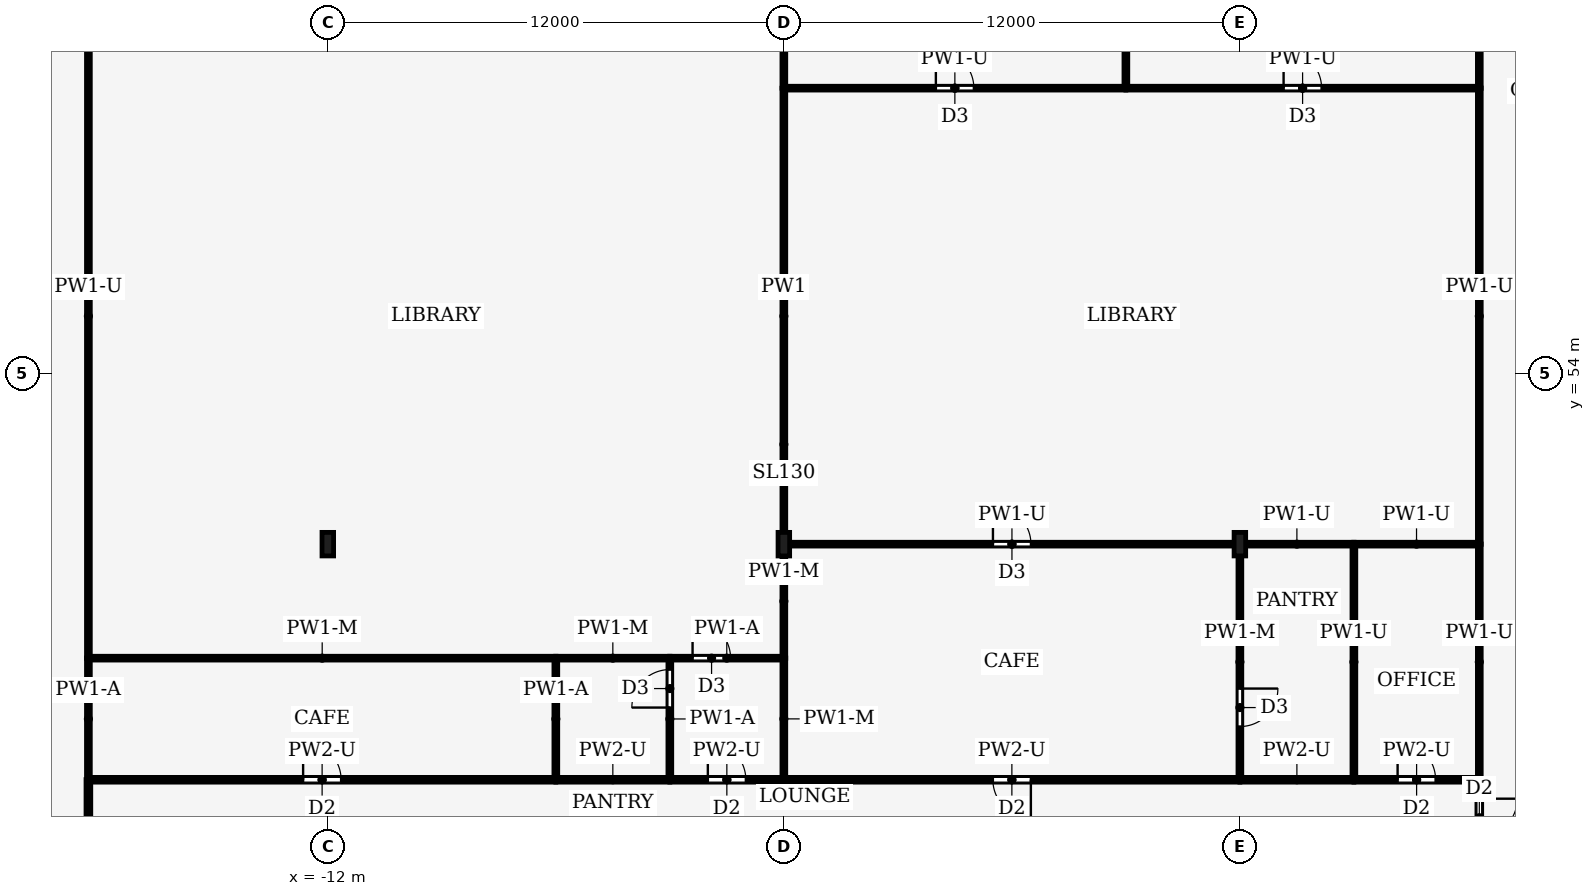
"""IFC4 building model, lengths in metres.
Left out: names, types, materials, properties, quantities, classifications, styles, units other than length and angle.
Written with IfcOpenShell. Run it as: python <this file> out.ifc"""

import sys

from ifc_helpers import new_model, si_unit, direction, frame, frame_2d, origin, origin_2d, place, context, subcontext, project, spatial, rectangle, i_section, extrude, element, fill, save


model = new_model("IFC4")
c1 = context("Model", 3, precision=1e-05, world=origin(), true_north=direction((0.0, 1.0)))
c2 = subcontext(c1, "Body", "Model", "MODEL_VIEW")
j1 = project(units=[si_unit("LENGTHUNIT", "METRE"), si_unit("PLANEANGLEUNIT", "RADIAN")], contexts=[c1])
p1 = place(None, origin())
s1 = spatial("IfcSite", under=j1, at=p1, CompositionType="ELEMENT")
p2 = place(p1, origin())
s2 = spatial("IfcBuilding", under=s1, at=p2, CompositionType="ELEMENT")
p3 = place(p2, frame((0.0, 0.0, 177.0)))
s3 = spatial("IfcBuildingStorey", under=s2, at=p3, CompositionType="ELEMENT", Elevation=177.0)
for number, where, z_axis, x_axis in (
    (1, (-12.0, 49.5, 0.0), (0.0, 0.0, 1.0), (1.0, 0.0, 0.0)),
    (2, (0.0, 49.5, 0.0), (0.0, 0.0, 1.0), (1.0, 0.0, 0.0)),
    (3, (12.0, 49.5, 0.0), (0.0, 0.0, 1.0), (1.0, 0.0, 0.0)),
):
    element("IfcColumn", number, at=place(p3, frame(where, z_axis=z_axis, x_axis=x_axis)), inside=s3, PredefinedType="COLUMN", context=c2, shape_type="SweptSolid", body=[
        extrude(i_section(OverallWidth=0.305, OverallDepth=0.62, WebThickness=0.021, FlangeThickness=0.04, FilletRadius=0.027, at=origin_2d()), origin(), (0.0, 0.0, 1.0), 5.0),
    ])
p4 = place(p3, frame((-18.3, 43.3, 0.0), z_axis=(0.0, 0.0, 1.0), x_axis=(1.0, 0.0, 0.0)))
e4 = element("IfcWall", 4, at=p4, inside=s3, PredefinedType="PARTITIONING", context=c2, shape_type="SweptSolid", body=[
    extrude(rectangle(XDim=12.3, YDim=0.125, at=frame_2d((6.15, 0.0))), origin(), (0.0, 0.0, 1.0), 4.44),
])
p5 = place(p4, frame((5.65, 0.0, 0.0)))
e5 = element("IfcOpeningElement", 5, at=p5, cuts=e4, PredefinedType="OPENING", context=c2, shape_type="SweptSolid", body=[
    extrude(rectangle(XDim=1.0, YDim=2.1, at=frame_2d((0.5, 1.05))), frame((0.0, 0.073, 0.0), z_axis=(0.0, -1.0, 0.0), x_axis=(1.0, 0.0, 0.0)), (0.0, 0.0, 1.0), 0.145),
])
p6 = place(p3, frame((-3.0, 43.3, 0.0), z_axis=(0.0, 0.0, 1.0), x_axis=(-1.0, 0.0, 0.0)))
e6 = element("IfcWall", 6, at=p6, inside=s3, PredefinedType="PARTITIONING", context=c2, shape_type="SweptSolid", body=[
    extrude(rectangle(XDim=3.0, YDim=0.125, at=frame_2d((1.5, 0.0))), origin(), (0.0, 0.0, 1.0), 4.44),
])
p7 = place(p3, frame((-3.0, 43.3, 0.0), z_axis=(0.0, 0.0, 1.0), x_axis=(1.0, 0.0, 0.0)))
e7 = element("IfcWall", 7, at=p7, inside=s3, PredefinedType="PARTITIONING", context=c2, shape_type="SweptSolid", body=[
    extrude(rectangle(XDim=3.0, YDim=0.125, at=frame_2d((1.5, 0.0))), origin(), (0.0, 0.0, 1.0), 4.44),
])
p8 = place(p7, frame((1.0, 0.0, 0.0)))
e8 = element("IfcOpeningElement", 8, at=p8, cuts=e7, PredefinedType="OPENING", context=c2, shape_type="SweptSolid", body=[
    extrude(rectangle(XDim=1.0, YDim=2.1, at=frame_2d((0.5, 1.05))), frame((0.0, 0.073, 0.0), z_axis=(0.0, -1.0, 0.0), x_axis=(1.0, 0.0, 0.0)), (0.0, 0.0, 1.0), 0.145),
])
p9 = place(p3, frame((12.0, 43.3, 0.0), z_axis=(0.0, 0.0, 1.0), x_axis=(-1.0, 0.0, 0.0)))
e9 = element("IfcWall", 9, at=p9, inside=s3, PredefinedType="PARTITIONING", context=c2, shape_type="SweptSolid", body=[
    extrude(rectangle(XDim=12.0, YDim=0.125, at=frame_2d((6.0, 0.0))), origin(), (0.0, 0.0, 1.0), 4.44),
])
p10 = place(p9, frame((5.5, 0.0, 0.0)))
e10 = element("IfcOpeningElement", 10, at=p10, cuts=e9, PredefinedType="OPENING", context=c2, shape_type="SweptSolid", body=[
    extrude(rectangle(XDim=1.0, YDim=2.1, at=frame_2d((0.5, 1.05))), frame((0.0, 0.073, 0.0), z_axis=(0.0, -1.0, 0.0), x_axis=(1.0, 0.0, 0.0)), (0.0, 0.0, 1.0), 0.145),
])
p11 = place(p3, frame((15.0, 43.3, 0.0), z_axis=(0.0, 0.0, 1.0), x_axis=(-1.0, 0.0, 0.0)))
e11 = element("IfcWall", 11, at=p11, inside=s3, PredefinedType="PARTITIONING", context=c2, shape_type="SweptSolid", body=[
    extrude(rectangle(XDim=3.0, YDim=0.125, at=frame_2d((1.5, 0.0))), origin(), (0.0, 0.0, 1.0), 4.44),
])
p12 = place(p3, frame((15.0, 43.3, 0.0), z_axis=(0.0, 0.0, 1.0), x_axis=(1.0, 0.0, 0.0)))
e12 = element("IfcWall", 12, at=p12, inside=s3, PredefinedType="PARTITIONING", context=c2, shape_type="SweptSolid", body=[
    extrude(rectangle(XDim=3.3, YDim=0.125, at=frame_2d((1.65, 0.0))), origin(), (0.0, 0.0, 1.0), 4.44),
])
p13 = place(p12, frame((1.15, 0.0, 0.0)))
e13 = element("IfcOpeningElement", 13, at=p13, cuts=e12, PredefinedType="OPENING", context=c2, shape_type="SweptSolid", body=[
    extrude(rectangle(XDim=1.0, YDim=2.1, at=frame_2d((0.5, 1.05))), frame((0.0, 0.073, 0.0), z_axis=(0.0, -1.0, 0.0), x_axis=(1.0, 0.0, 0.0)), (0.0, 0.0, 1.0), 0.145),
])
p14 = place(p3, frame((-18.3, 43.304, 0.0), z_axis=(0.0, 0.0, 1.0), x_axis=(0.0, -1.0, 0.0)))
e14 = element("IfcWall", 14, at=p14, inside=s3, PredefinedType="PARTITIONING", context=c2, shape_type="SweptSolid", body=[
    extrude(rectangle(XDim=8.804, YDim=0.125, at=frame_2d((4.402, 0.0))), origin(), (0.0, 0.0, 1.0), 4.14),
])
p15 = place(p14, frame((4.302, 0.0, 0.0)))
e15 = element("IfcOpeningElement", 15, at=p15, cuts=e14, PredefinedType="OPENING", context=c2, shape_type="SweptSolid", body=[
    extrude(rectangle(XDim=1.8, YDim=2.1, at=frame_2d((0.9, 1.05))), frame((0.0, 0.073, 0.0), z_axis=(0.0, -1.0, 0.0), x_axis=(1.0, 0.0, 0.0)), (0.0, 0.0, 1.0), 0.145),
])
p16 = place(p3, frame((18.3, 43.304, 0.0), z_axis=(0.0, 0.0, 1.0), x_axis=(0.0, -1.0, 0.0)))
e16 = element("IfcWall", 16, at=p16, inside=s3, PredefinedType="PARTITIONING", context=c2, shape_type="SweptSolid", body=[
    extrude(rectangle(XDim=2.804, YDim=0.125, at=frame_2d((1.402, 0.0))), origin(), (0.0, 0.0, 1.0), 4.87),
])
p17 = place(p16, frame((0.502, 0.0, 0.0)))
e17 = element("IfcOpeningElement", 17, at=p17, cuts=e16, PredefinedType="OPENING", context=c2, shape_type="SweptSolid", body=[
    extrude(rectangle(XDim=1.0, YDim=2.1, at=frame_2d((0.5, 1.05))), frame((0.0, 0.073, 0.0), z_axis=(0.0, -1.0, 0.0), x_axis=(1.0, 0.0, 0.0)), (0.0, 0.0, 1.0), 0.145),
])
p18 = place(p3, frame((-6.0, 43.3, 0.0), z_axis=(0.0, 0.0, 1.0), x_axis=(0.0, 1.0, 0.0)))
e18 = element("IfcWall", 18, at=p18, inside=s3, PredefinedType="PARTITIONING", context=c2, shape_type="SweptSolid", body=[
    extrude(rectangle(XDim=3.2, YDim=0.1, at=frame_2d((1.6, 0.0))), origin(), (0.0, 0.0, 1.0), 4.87),
])
p19 = place(p3, frame((-5.996, 46.5, 0.0), z_axis=(0.0, 0.0, 1.0), x_axis=(-1.0, 0.0, 0.0)))
e19 = element("IfcWall", 19, at=p19, inside=s3, PredefinedType="PARTITIONING", context=c2, shape_type="SweptSolid", body=[
    extrude(rectangle(XDim=12.304, YDim=0.1, at=frame_2d((6.152, 0.0))), origin(), (0.0, 0.0, 1.0), 4.44),
])
p20 = place(p3, frame((-18.3, 46.504, 0.0), z_axis=(0.0, 0.0, 1.0), x_axis=(0.0, -1.0, 0.0)))
e20 = element("IfcWall", 20, at=p20, inside=s3, PredefinedType="PARTITIONING", context=c2, shape_type="SweptSolid", body=[
    extrude(rectangle(XDim=3.208, YDim=0.1, at=frame_2d((1.604, 0.0))), origin(), (0.0, 0.0, 1.0), 4.87),
])
p21 = place(p3, frame((-3.0, 43.3, 0.0), z_axis=(0.0, 0.0, 1.0), x_axis=(0.0, 1.0, 0.0)))
e21 = element("IfcWall", 21, at=p21, inside=s3, PredefinedType="PARTITIONING", context=c2, shape_type="SweptSolid", body=[
    extrude(rectangle(XDim=3.2, YDim=0.1, at=frame_2d((1.6, 0.0))), origin(), (0.0, 0.0, 1.0), 4.87),
])
p22 = place(p21, frame((1.9, 0.0, 0.0)))
e22 = element("IfcOpeningElement", 22, at=p22, cuts=e21, PredefinedType="OPENING", context=c2, shape_type="SweptSolid", body=[
    extrude(rectangle(XDim=1.0, YDim=2.1, at=frame_2d((0.5, 1.05))), frame((0.0, 0.06, 0.0), z_axis=(0.0, -1.0, 0.0), x_axis=(1.0, 0.0, 0.0)), (0.0, 0.0, 1.0), 0.12),
])
p23 = place(p3, frame((-2.996, 46.5, 0.0), z_axis=(0.0, 0.0, 1.0), x_axis=(-1.0, 0.0, 0.0)))
e23 = element("IfcWall", 23, at=p23, inside=s3, PredefinedType="PARTITIONING", context=c2, shape_type="SweptSolid", body=[
    extrude(rectangle(XDim=3.008, YDim=0.1, at=frame_2d((1.504, 0.0))), origin(), (0.0, 0.0, 1.0), 4.44),
])
p24 = place(p3, frame((-3.004, 46.5, 0.0), z_axis=(0.0, 0.0, 1.0), x_axis=(1.0, 0.0, 0.0)))
e24 = element("IfcWall", 24, at=p24, inside=s3, PredefinedType="PARTITIONING", context=c2, shape_type="SweptSolid", body=[
    extrude(rectangle(XDim=3.004, YDim=0.1, at=frame_2d((1.502, 0.0))), origin(), (0.0, 0.0, 1.0), 4.87),
])
p25 = place(p24, frame((0.602, 0.0, 0.0)))
e25 = element("IfcOpeningElement", 25, at=p25, cuts=e24, PredefinedType="OPENING", context=c2, shape_type="SweptSolid", body=[
    extrude(rectangle(XDim=1.0, YDim=2.1, at=frame_2d((0.5, 1.05))), frame((0.0, 0.06, 0.0), z_axis=(0.0, -1.0, 0.0), x_axis=(1.0, 0.0, 0.0)), (0.0, 0.0, 1.0), 0.12),
])
p26 = place(p3, frame((0.0, 43.3, 0.0), z_axis=(0.0, 0.0, 1.0), x_axis=(0.0, 1.0, 0.0)))
e26 = element("IfcWall", 26, at=p26, inside=s3, PredefinedType="PARTITIONING", context=c2, shape_type="SweptSolid", body=[
    extrude(rectangle(XDim=3.204, YDim=0.1, at=frame_2d((1.602, 0.0))), origin(), (0.0, 0.0, 1.0), 4.44),
])
p27 = place(p3, frame((0.0, 46.496, 0.0), z_axis=(0.0, 0.0, 1.0), x_axis=(0.0, 1.0, 0.0)))
e27 = element("IfcWall", 27, at=p27, inside=s3, PredefinedType="PARTITIONING", context=c2, shape_type="SweptSolid", body=[
    extrude(rectangle(XDim=3.004, YDim=0.1, at=frame_2d((1.502, 0.0))), origin(), (0.0, 0.0, 1.0), 4.44),
])
p28 = place(p3, frame((0.0, 49.5, 0.0), z_axis=(0.0, 0.0, 1.0), x_axis=(0.0, 1.0, 0.0)))
e28 = element("IfcWall", 28, at=p28, inside=s3, PredefinedType="PARTITIONING", context=c2, shape_type="SweptSolid", body=[
    extrude(rectangle(XDim=12.0, YDim=0.1, at=frame_2d((6.0, 0.0))), origin(), (0.0, 0.0, 1.0), 4.29),
])
p29 = place(p3, frame((0.0, 61.5, 0.0), z_axis=(0.0, 0.0, 1.0), x_axis=(0.0, 1.0, 0.0)))
e29 = element("IfcWall", 29, at=p29, inside=s3, PredefinedType="PARTITIONING", context=c2, shape_type="SweptSolid", body=[
    extrude(rectangle(XDim=3.004, YDim=0.1, at=frame_2d((1.502, 0.0))), origin(), (0.0, 0.0, 1.0), 4.29),
])
p30 = place(p3, frame((-18.3, 64.504, 0.0), z_axis=(0.0, 0.0, 1.0), x_axis=(0.0, -1.0, 0.0)))
e30 = element("IfcWall", 30, at=p30, inside=s3, PredefinedType="PARTITIONING", context=c2, shape_type="SweptSolid", body=[
    extrude(rectangle(XDim=18.008, YDim=0.1, at=frame_2d((9.004, 0.0))), origin(), (0.0, 0.0, 1.0), 4.24),
])
p31 = place(p3, frame((12.0, 49.5, 0.0), z_axis=(0.0, 0.0, 1.0), x_axis=(0.0, -1.0, 0.0)))
e31 = element("IfcWall", 31, at=p31, inside=s3, PredefinedType="PARTITIONING", context=c2, shape_type="SweptSolid", body=[
    extrude(rectangle(XDim=6.2, YDim=0.1, at=frame_2d((3.1, 0.0))), origin(), (0.0, 0.0, 1.0), 4.44),
])
p32 = place(p31, frame((3.8, 0.0, 0.0)))
e32 = element("IfcOpeningElement", 32, at=p32, cuts=e31, PredefinedType="OPENING", context=c2, shape_type="SweptSolid", body=[
    extrude(rectangle(XDim=1.0, YDim=2.1, at=frame_2d((0.5, 1.05))), frame((0.0, 0.06, 0.0), z_axis=(0.0, -1.0, 0.0), x_axis=(1.0, 0.0, 0.0)), (0.0, 0.0, 1.0), 0.12),
])
p33 = place(p3, frame((0.0, 49.5, 0.0), z_axis=(0.0, 0.0, 1.0), x_axis=(1.0, 0.0, 0.0)))
e33 = element("IfcWall", 33, at=p33, inside=s3, PredefinedType="PARTITIONING", context=c2, shape_type="SweptSolid", body=[
    extrude(rectangle(XDim=12.004, YDim=0.1, at=frame_2d((6.002, 0.0))), origin(), (0.0, 0.0, 1.0), 4.24),
])
p34 = place(p33, frame((5.502, 0.0, 0.0)))
e34 = element("IfcOpeningElement", 34, at=p34, cuts=e33, PredefinedType="OPENING", context=c2, shape_type="SweptSolid", body=[
    extrude(rectangle(XDim=1.0, YDim=2.1, at=frame_2d((0.5, 1.05))), frame((0.0, 0.06, 0.0), z_axis=(0.0, -1.0, 0.0), x_axis=(1.0, 0.0, 0.0)), (0.0, 0.0, 1.0), 0.12),
])
p35 = place(p3, frame((15.0, 43.3, 0.0), z_axis=(0.0, 0.0, 1.0), x_axis=(0.0, 1.0, 0.0)))
e35 = element("IfcWall", 35, at=p35, inside=s3, PredefinedType="PARTITIONING", context=c2, shape_type="SweptSolid", body=[
    extrude(rectangle(XDim=6.2, YDim=0.1, at=frame_2d((3.1, 0.0))), origin(), (0.0, 0.0, 1.0), 4.24),
])
p36 = place(p3, frame((15.004, 49.5, 0.0), z_axis=(0.0, 0.0, 1.0), x_axis=(-1.0, 0.0, 0.0)))
e36 = element("IfcWall", 36, at=p36, inside=s3, PredefinedType="PARTITIONING", context=c2, shape_type="SweptSolid", body=[
    extrude(rectangle(XDim=3.008, YDim=0.1, at=frame_2d((1.504, 0.0))), origin(), (0.0, 0.0, 1.0), 4.24),
])
p37 = place(p3, frame((18.3, 49.5, 0.0), z_axis=(0.0, 0.0, 1.0), x_axis=(-1.0, 0.0, 0.0)))
e37 = element("IfcWall", 37, at=p37, inside=s3, PredefinedType="PARTITIONING", context=c2, shape_type="SweptSolid", body=[
    extrude(rectangle(XDim=3.304, YDim=0.1, at=frame_2d((1.652, 0.0))), origin(), (0.0, 0.0, 1.0), 4.24),
])
p38 = place(p3, frame((18.3, 43.296, 0.0), z_axis=(0.0, 0.0, 1.0), x_axis=(0.0, 1.0, 0.0)))
e38 = element("IfcWall", 38, at=p38, inside=s3, PredefinedType="PARTITIONING", context=c2, shape_type="SweptSolid", body=[
    extrude(rectangle(XDim=6.208, YDim=0.1, at=frame_2d((3.104, 0.0))), origin(), (0.0, 0.0, 1.0), 4.24),
])
p39 = place(p3, frame((0.0, 61.5, 0.0), z_axis=(0.0, 0.0, 1.0), x_axis=(1.0, 0.0, 0.0)))
e39 = element("IfcWall", 39, at=p39, inside=s3, PredefinedType="PARTITIONING", context=c2, shape_type="SweptSolid", body=[
    extrude(rectangle(XDim=9.0, YDim=0.1, at=frame_2d((4.5, 0.0))), origin(), (0.0, 0.0, 1.0), 4.24),
])
p40 = place(p39, frame((4.0, 0.0, 0.0)))
e40 = element("IfcOpeningElement", 40, at=p40, cuts=e39, PredefinedType="OPENING", context=c2, shape_type="SweptSolid", body=[
    extrude(rectangle(XDim=1.0, YDim=2.1, at=frame_2d((0.5, 1.05))), frame((0.0, 0.06, 0.0), z_axis=(0.0, -1.0, 0.0), x_axis=(1.0, 0.0, 0.0)), (0.0, 0.0, 1.0), 0.12),
])
p41 = place(p3, frame((9.0, 61.5, 0.0), z_axis=(0.0, 0.0, 1.0), x_axis=(1.0, 0.0, 0.0)))
e41 = element("IfcWall", 41, at=p41, inside=s3, PredefinedType="PARTITIONING", context=c2, shape_type="SweptSolid", body=[
    extrude(rectangle(XDim=9.3, YDim=0.1, at=frame_2d((4.65, 0.0))), origin(), (0.0, 0.0, 1.0), 4.24),
])
p42 = place(p41, frame((4.15, 0.0, 0.0)))
e42 = element("IfcOpeningElement", 42, at=p42, cuts=e41, PredefinedType="OPENING", context=c2, shape_type="SweptSolid", body=[
    extrude(rectangle(XDim=1.0, YDim=2.1, at=frame_2d((0.5, 1.05))), frame((0.0, 0.06, 0.0), z_axis=(0.0, -1.0, 0.0), x_axis=(1.0, 0.0, 0.0)), (0.0, 0.0, 1.0), 0.12),
])
p43 = place(p3, frame((18.3, 49.496, 0.0), z_axis=(0.0, 0.0, 1.0), x_axis=(0.0, 1.0, 0.0)))
e43 = element("IfcWall", 43, at=p43, inside=s3, PredefinedType="PARTITIONING", context=c2, shape_type="SweptSolid", body=[
    extrude(rectangle(XDim=12.008, YDim=0.1, at=frame_2d((6.004, 0.0))), origin(), (0.0, 0.0, 1.0), 4.24),
])
p44 = place(p3, frame((9.0, 61.5, 0.0), z_axis=(0.0, 0.0, 1.0), x_axis=(0.0, 1.0, 0.0)))
e44 = element("IfcWall", 44, at=p44, inside=s3, PredefinedType="PARTITIONING", context=c2, shape_type="SweptSolid", body=[
    extrude(rectangle(XDim=6.83, YDim=0.1, at=frame_2d((3.415, 0.0))), origin(), (0.0, 0.0, 1.0), 4.04),
])
p45 = place(p3, frame((18.3, 61.496, 0.0), z_axis=(0.0, 0.0, 1.0), x_axis=(0.0, 1.0, 0.0)))
e45 = element("IfcWall", 45, at=p45, inside=s3, PredefinedType="PARTITIONING", context=c2, shape_type="SweptSolid", body=[
    extrude(rectangle(XDim=7.524, YDim=0.1, at=frame_2d((3.762, 0.0))), origin(), (0.0, 0.0, 1.0), 3.93),
])
p46 = place(p5, origin())
e46 = element("IfcDoor", 46, at=p46, inside=s3, OperationType="SINGLE_SWING_LEFT", PredefinedType="DOOR", context=c2, shape_type="SweptSolid", body=[
    extrude(rectangle(XDim=1.0, YDim=2.1, at=frame_2d((0.5, 1.05))), frame((0.0, 0.025, 0.0), z_axis=(0.0, -1.0, 0.0), x_axis=(1.0, 0.0, 0.0)), (0.0, 0.0, 1.0), 0.05),
])
fill(e5, e46)
p47 = place(p8, origin())
e47 = element("IfcDoor", 47, at=p47, inside=s3, OperationType="SINGLE_SWING_RIGHT", PredefinedType="DOOR", context=c2, shape_type="SweptSolid", body=[
    extrude(rectangle(XDim=1.0, YDim=2.1, at=frame_2d((0.5, 1.05))), frame((0.0, 0.025, 0.0), z_axis=(0.0, -1.0, 0.0), x_axis=(1.0, 0.0, 0.0)), (0.0, 0.0, 1.0), 0.05),
])
fill(e8, e47)
p48 = place(p10, origin())
e48 = element("IfcDoor", 48, at=p48, inside=s3, OperationType="SINGLE_SWING_LEFT", PredefinedType="DOOR", context=c2, shape_type="SweptSolid", body=[
    extrude(rectangle(XDim=1.0, YDim=2.1, at=frame_2d((0.5, 1.05))), frame((0.0, 0.025, 0.0), z_axis=(0.0, -1.0, 0.0), x_axis=(1.0, 0.0, 0.0)), (0.0, 0.0, 1.0), 0.05),
])
fill(e10, e48)
p49 = place(p13, origin())
e49 = element("IfcDoor", 49, at=p49, inside=s3, OperationType="SINGLE_SWING_RIGHT", PredefinedType="DOOR", context=c2, shape_type="SweptSolid", body=[
    extrude(rectangle(XDim=1.0, YDim=2.1, at=frame_2d((0.5, 1.05))), frame((0.0, 0.025, 0.0), z_axis=(0.0, -1.0, 0.0), x_axis=(1.0, 0.0, 0.0)), (0.0, 0.0, 1.0), 0.05),
])
fill(e13, e49)
p50 = place(p17, origin())
e50 = element("IfcDoor", 50, at=p50, inside=s3, OperationType="SINGLE_SWING_LEFT", PredefinedType="DOOR", context=c2, shape_type="SweptSolid", body=[
    extrude(rectangle(XDim=1.0, YDim=2.1, at=frame_2d((0.5, 1.05))), frame((0.0, 0.025, 0.0), z_axis=(0.0, -1.0, 0.0), x_axis=(1.0, 0.0, 0.0)), (0.0, 0.0, 1.0), 0.05),
])
fill(e17, e50)
p51 = place(p22, origin())
e51 = element("IfcDoor", 51, at=p51, inside=s3, OperationType="SINGLE_SWING_RIGHT", PredefinedType="DOOR", context=c2, shape_type="SweptSolid", body=[
    extrude(rectangle(XDim=1.0, YDim=2.1, at=frame_2d((0.5, 1.05))), frame((0.0, 0.025, 0.0), z_axis=(0.0, -1.0, 0.0), x_axis=(1.0, 0.0, 0.0)), (0.0, 0.0, 1.0), 0.05),
])
fill(e22, e51)
p52 = place(p25, origin())
e52 = element("IfcDoor", 52, at=p52, inside=s3, OperationType="SINGLE_SWING_LEFT", PredefinedType="DOOR", context=c2, shape_type="SweptSolid", body=[
    extrude(rectangle(XDim=1.0, YDim=2.1, at=frame_2d((0.5, 1.05))), frame((0.0, 0.025, 0.0), z_axis=(0.0, -1.0, 0.0), x_axis=(1.0, 0.0, 0.0)), (0.0, 0.0, 1.0), 0.05),
])
fill(e25, e52)
p53 = place(p32, origin())
e53 = element("IfcDoor", 53, at=p53, inside=s3, OperationType="SINGLE_SWING_RIGHT", PredefinedType="DOOR", context=c2, shape_type="SweptSolid", body=[
    extrude(rectangle(XDim=1.0, YDim=2.1, at=frame_2d((0.5, 1.05))), frame((0.0, 0.025, 0.0), z_axis=(0.0, -1.0, 0.0), x_axis=(1.0, 0.0, 0.0)), (0.0, 0.0, 1.0), 0.05),
])
fill(e32, e53)
p54 = place(p34, origin())
e54 = element("IfcDoor", 54, at=p54, inside=s3, OperationType="SINGLE_SWING_RIGHT", PredefinedType="DOOR", context=c2, shape_type="SweptSolid", body=[
    extrude(rectangle(XDim=1.0, YDim=2.1, at=frame_2d((0.5, 1.05))), frame((0.0, 0.025, 0.0), z_axis=(0.0, -1.0, 0.0), x_axis=(1.0, 0.0, 0.0)), (0.0, 0.0, 1.0), 0.05),
])
fill(e34, e54)
p55 = place(p40, origin())
e55 = element("IfcDoor", 55, at=p55, inside=s3, OperationType="SINGLE_SWING_LEFT", PredefinedType="DOOR", context=c2, shape_type="SweptSolid", body=[
    extrude(rectangle(XDim=1.0, YDim=2.1, at=frame_2d((0.5, 1.05))), frame((0.0, 0.025, 0.0), z_axis=(0.0, -1.0, 0.0), x_axis=(1.0, 0.0, 0.0)), (0.0, 0.0, 1.0), 0.05),
])
fill(e40, e55)
p56 = place(p42, origin())
e56 = element("IfcDoor", 56, at=p56, inside=s3, OperationType="SINGLE_SWING_RIGHT", PredefinedType="DOOR", context=c2, shape_type="SweptSolid", body=[
    extrude(rectangle(XDim=1.0, YDim=2.1, at=frame_2d((0.5, 1.05))), frame((0.0, 0.025, 0.0), z_axis=(0.0, -1.0, 0.0), x_axis=(1.0, 0.0, 0.0)), (0.0, 0.0, 1.0), 0.05),
])
fill(e42, e56)
save(model, sys.argv[1])
